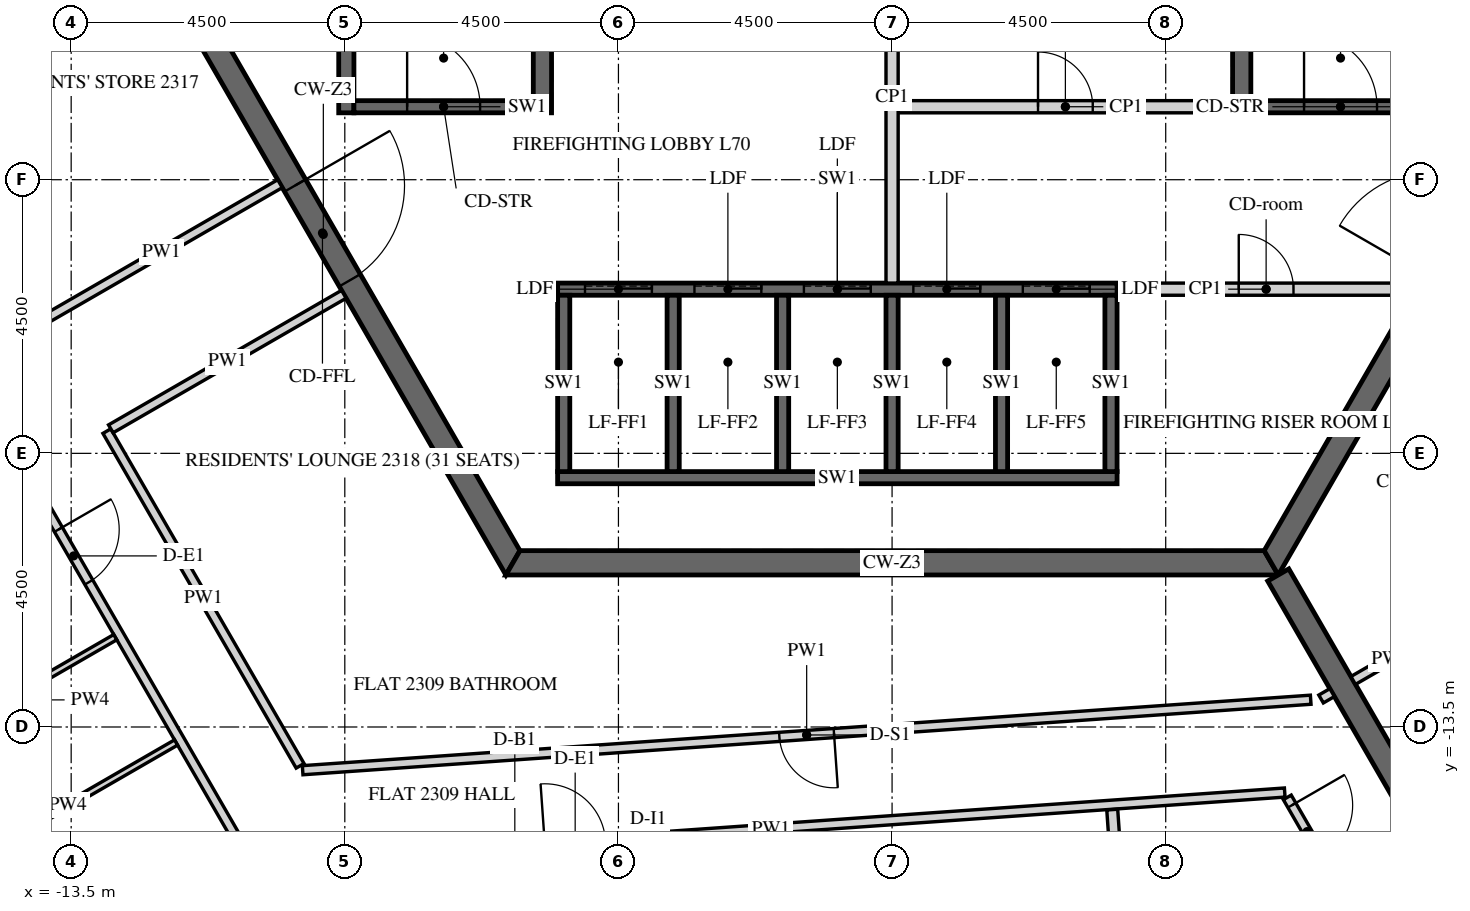
"""IFC4 building model, lengths in metres.
Left out: names, types, materials, properties, quantities, classifications, styles, units other than length and angle.
Written with IfcOpenShell. Run it as: python <this file> out.ifc"""

import sys

from ifc_helpers import new_model, si_unit, direction, frame, frame_2d, origin, place, context, subcontext, project, spatial, polyline, rectangle, outline, extrude, element, fill, save


model = new_model("IFC4")
c1 = context("Model", 3, precision=1e-05, world=origin(), true_north=direction((0.0, 1.0)))
c2 = subcontext(c1, "Body", "Model", "MODEL_VIEW")
j1 = project(units=[si_unit("LENGTHUNIT", "METRE"), si_unit("PLANEANGLEUNIT", "RADIAN")], contexts=[c1])
p1 = place(None, origin())
s1 = spatial("IfcSite", under=j1, at=p1, CompositionType="ELEMENT")
p2 = place(p1, origin())
s2 = spatial("IfcBuilding", under=s1, at=p2, CompositionType="ELEMENT")
p3 = place(p2, frame((0.0, 0.0, 291.3)))
s3 = spatial("IfcBuildingStorey", under=s2, at=p3, CompositionType="ELEMENT", Elevation=291.3)
p4 = place(p3, frame((-12.471, 0.0, -0.15), z_axis=(0.0, 0.0, 1.0), x_axis=(0.499996419489, -0.866027470984, 0.0)))
e1 = element("IfcWall", 1, at=p4, inside=s3, PredefinedType="SHEAR", context=c2, shape_type="SweptSolid", body=[
    extrude(outline(polyline([(-0.115, -0.2), (12.586, -0.2), (12.355, 0.2), (0.115, 0.2), (-0.115, -0.2)])), origin(), (0.0, 0.0, 1.0), 3.9),
])
p5 = place(p4, frame((5.306, 0.0, 0.15)))
e2 = element("IfcOpeningElement", 2, at=p5, cuts=e1, PredefinedType="OPENING", context=c2, shape_type="SweptSolid", body=[
    extrude(rectangle(XDim=1.8, YDim=2.4, at=frame_2d((0.9, 1.2))), frame((0.0, 0.21, 0.0), z_axis=(0.0, -1.0, 0.0), x_axis=(1.0, 0.0, 0.0)), (0.0, 0.0, 1.0), 0.42),
])
p6 = place(p3, frame((-6.235, -10.8, -0.15), z_axis=(0.0, 0.0, 1.0), x_axis=(1.0, 0.0, 0.0)))
e3 = element("IfcWall", 3, at=p6, inside=s3, PredefinedType="SHEAR", context=c2, shape_type="SweptSolid", body=[
    extrude(outline(polyline([(-0.115, -0.2), (12.586, -0.2), (12.355, 0.2), (0.115, 0.2), (-0.115, -0.2)])), origin(), (0.0, 0.0, 1.0), 3.9),
])
p7 = place(p3, frame((6.235, -10.8, -0.15), z_axis=(0.0, 0.0, 1.0), x_axis=(0.499996419489, 0.866027470984, 0.0)))
e4 = element("IfcWall", 4, at=p7, inside=s3, PredefinedType="SHEAR", context=c2, shape_type="SweptSolid", body=[
    extrude(outline(polyline([(-0.115, -0.2), (12.586, -0.2), (12.355, 0.2), (0.115, 0.2), (-0.115, -0.2)])), origin(), (0.0, 0.0, 1.0), 3.9),
])
p8 = place(p7, frame((5.364, 0.0, 0.15)))
e5 = element("IfcOpeningElement", 5, at=p8, cuts=e4, PredefinedType="OPENING", context=c2, shape_type="SweptSolid", body=[
    extrude(rectangle(XDim=1.8, YDim=2.4, at=frame_2d((0.9, 1.2))), frame((0.0, 0.21, 0.0), z_axis=(0.0, -1.0, 0.0), x_axis=(1.0, 0.0, 0.0)), (0.0, 0.0, 1.0), 0.42),
])
p9 = place(p3, frame((6.351, -11.0, -0.15), z_axis=(0.0, 0.0, 1.0), x_axis=(0.499998894578, -0.866026041999, 0.0)))
e6 = element("IfcWall", 6, at=p9, inside=s3, PredefinedType="SHEAR", context=c2, shape_type="SweptSolid", body=[
    extrude(rectangle(XDim=15.544, YDim=0.4, at=frame_2d((7.772, 0.0))), origin(), (0.0, 0.0, 1.0), 3.9),
])
p10 = place(p9, frame((6.872, 0.0, 0.15)))
e7 = element("IfcOpeningElement", 7, at=p10, cuts=e6, PredefinedType="OPENING", context=c2, shape_type="SweptSolid", body=[
    extrude(rectangle(XDim=1.8, YDim=2.4, at=frame_2d((0.9, 1.2))), frame((0.0, 0.21, 0.0), z_axis=(0.0, -1.0, 0.0), x_axis=(1.0, 0.0, 0.0)), (0.0, 0.0, 1.0), 0.42),
])
p11 = place(p3, frame((-5.5, -6.3, -0.25), z_axis=(0.0, 0.0, 1.0), x_axis=(1.0, 0.0, 0.0)))
e8 = element("IfcWall", 8, at=p11, inside=s3, PredefinedType="SHEAR", context=c2, shape_type="SweptSolid", body=[
    extrude(rectangle(XDim=9.2, YDim=0.2, at=frame_2d((4.6, 0.0))), origin(), (0.0, 0.0, 1.0), 3.9),
])
p12 = place(p11, frame((0.45, 0.0, 0.25)))
e9 = element("IfcOpeningElement", 9, at=p12, cuts=e8, PredefinedType="OPENING", context=c2, shape_type="SweptSolid", body=[
    extrude(rectangle(XDim=1.1, YDim=2.1, at=frame_2d((0.55, 1.05))), frame((0.0, 0.11, 0.0), z_axis=(0.0, -1.0, 0.0), x_axis=(1.0, 0.0, 0.0)), (0.0, 0.0, 1.0), 0.22),
])
p13 = place(p11, frame((2.25, 0.0, 0.25)))
e10 = element("IfcOpeningElement", 10, at=p13, cuts=e8, PredefinedType="OPENING", context=c2, shape_type="SweptSolid", body=[
    extrude(rectangle(XDim=1.1, YDim=2.1, at=frame_2d((0.55, 1.05))), frame((0.0, 0.11, 0.0), z_axis=(0.0, -1.0, 0.0), x_axis=(1.0, 0.0, 0.0)), (0.0, 0.0, 1.0), 0.22),
])
p14 = place(p11, frame((4.05, 0.0, 0.25)))
e11 = element("IfcOpeningElement", 11, at=p14, cuts=e8, PredefinedType="OPENING", context=c2, shape_type="SweptSolid", body=[
    extrude(rectangle(XDim=1.1, YDim=2.1, at=frame_2d((0.55, 1.05))), frame((0.0, 0.11, 0.0), z_axis=(0.0, -1.0, 0.0), x_axis=(1.0, 0.0, 0.0)), (0.0, 0.0, 1.0), 0.22),
])
p15 = place(p11, frame((5.85, 0.0, 0.25)))
e12 = element("IfcOpeningElement", 12, at=p15, cuts=e8, PredefinedType="OPENING", context=c2, shape_type="SweptSolid", body=[
    extrude(rectangle(XDim=1.1, YDim=2.1, at=frame_2d((0.55, 1.05))), frame((0.0, 0.11, 0.0), z_axis=(0.0, -1.0, 0.0), x_axis=(1.0, 0.0, 0.0)), (0.0, 0.0, 1.0), 0.22),
])
p16 = place(p11, frame((7.65, 0.0, 0.25)))
e13 = element("IfcOpeningElement", 13, at=p16, cuts=e8, PredefinedType="OPENING", context=c2, shape_type="SweptSolid", body=[
    extrude(rectangle(XDim=1.1, YDim=2.1, at=frame_2d((0.55, 1.05))), frame((0.0, 0.11, 0.0), z_axis=(0.0, -1.0, 0.0), x_axis=(1.0, 0.0, 0.0)), (0.0, 0.0, 1.0), 0.22),
])
p17 = place(p3, frame((-5.5, -9.4, -0.25), z_axis=(0.0, 0.0, 1.0), x_axis=(1.0, 0.0, 0.0)))
e14 = element("IfcWall", 14, at=p17, inside=s3, PredefinedType="SHEAR", context=c2, shape_type="SweptSolid", body=[
    extrude(rectangle(XDim=9.2, YDim=0.2, at=frame_2d((4.6, 0.0))), origin(), (0.0, 0.0, 1.0), 3.9),
])
for number, where, z_axis, x_axis in (
    (15, (-5.4, -9.3, -0.25), (0.0, 0.0, 1.0), (0.0, 1.0, 0.0)),
    (16, (-3.6, -9.3, -0.25), (0.0, 0.0, 1.0), (0.0, 1.0, 0.0)),
    (17, (-1.8, -9.3, -0.25), (0.0, 0.0, 1.0), (0.0, 1.0, 0.0)),
    (18, (0.0, -9.3, -0.25), (0.0, 0.0, 1.0), (0.0, 1.0, 0.0)),
    (19, (1.8, -9.3, -0.25), (0.0, 0.0, 1.0), (0.0, 1.0, 0.0)),
    (20, (3.6, -9.3, -0.25), (0.0, 0.0, 1.0), (0.0, 1.0, 0.0)),
):
    element("IfcWall", number, at=place(p3, frame(where, z_axis=z_axis, x_axis=x_axis)), inside=s3, PredefinedType="SHEAR", context=c2, shape_type="SweptSolid", body=[
        extrude(rectangle(XDim=2.9, YDim=0.2, at=frame_2d((1.45, 0.0))), origin(), (0.0, 0.0, 1.0), 3.9),
    ])
p18 = place(p3, frame((0.1, -3.3, 0.0), z_axis=(0.0, 0.0, 1.0), x_axis=(1.0, 0.0, 0.0)))
e21 = element("IfcWall", 21, at=p18, inside=s3, PredefinedType="PARTITIONING", context=c2, shape_type="SweptSolid", body=[
    extrude(rectangle(XDim=5.5, YDim=0.2, at=frame_2d((2.75, 0.0))), origin(), (0.0, 0.0, 1.0), 3.65),
])
p19 = place(p18, frame((2.3, 0.0, 0.0)))
e22 = element("IfcOpeningElement", 22, at=p19, cuts=e21, PredefinedType="OPENING", context=c2, shape_type="SweptSolid", body=[
    extrude(rectangle(XDim=0.9, YDim=2.1, at=frame_2d((0.45, 1.05))), frame((0.0, 0.11, 0.0), z_axis=(0.0, -1.0, 0.0), x_axis=(1.0, 0.0, 0.0)), (0.0, 0.0, 1.0), 0.22),
])
p20 = place(p3, frame((0.0, -6.2, 0.0), z_axis=(0.0, 0.0, 1.0), x_axis=(0.0, 1.0, 0.0)))
e23 = element("IfcWall", 23, at=p20, inside=s3, PredefinedType="PARTITIONING", context=c2, shape_type="SweptSolid", body=[
    extrude(rectangle(XDim=6.1, YDim=0.2, at=frame_2d((3.05, 0.0))), origin(), (0.0, 0.0, 1.0), 3.65),
])
p21 = place(p3, frame((3.7, -6.3, 0.0), z_axis=(0.0, 0.0, 1.0), x_axis=(1.0, 0.0, 0.0)))
e24 = element("IfcWall", 24, at=p21, inside=s3, PredefinedType="PARTITIONING", context=c2, shape_type="SweptSolid", body=[
    extrude(rectangle(XDim=4.903, YDim=0.2, at=frame_2d((2.451, 0.0))), origin(), (0.0, 0.0, 1.0), 3.65),
])
p22 = place(p21, frame((2.001, 0.0, 0.0)))
e25 = element("IfcOpeningElement", 25, at=p22, cuts=e24, PredefinedType="OPENING", context=c2, shape_type="SweptSolid", body=[
    extrude(rectangle(XDim=0.9, YDim=2.1, at=frame_2d((0.45, 1.05))), frame((0.0, 0.11, 0.0), z_axis=(0.0, -1.0, 0.0), x_axis=(1.0, 0.0, 0.0)), (0.0, 0.0, 1.0), 0.22),
])
p23 = place(p3, frame((5.75, -3.4, -0.25), z_axis=(0.0, 0.0, 1.0), x_axis=(0.0, 1.0, 0.0)))
e26 = element("IfcWall", 26, at=p23, inside=s3, PredefinedType="SHEAR", context=c2, shape_type="SweptSolid", body=[
    extrude(rectangle(XDim=6.8, YDim=0.3, at=frame_2d((3.4, 0.0))), origin(), (0.0, 0.0, 1.0), 3.9),
])
p24 = place(p3, frame((5.9, -3.3, -0.25), z_axis=(0.0, 0.0, 1.0), x_axis=(1.0, 0.0, 0.0)))
e27 = element("IfcWall", 27, at=p24, inside=s3, PredefinedType="SHEAR", context=c2, shape_type="SweptSolid", body=[
    extrude(rectangle(XDim=2.95, YDim=0.2, at=frame_2d((1.475, 0.0))), origin(), (0.0, 0.0, 1.0), 3.9),
])
p25 = place(p24, frame((0.875, 0.0, 0.25)))
e28 = element("IfcOpeningElement", 28, at=p25, cuts=e27, PredefinedType="OPENING", context=c2, shape_type="SweptSolid", body=[
    extrude(rectangle(XDim=1.2, YDim=2.4, at=frame_2d((0.6, 1.2))), frame((0.0, 0.11, 0.0), z_axis=(0.0, -1.0, 0.0), x_axis=(1.0, 0.0, 0.0)), (0.0, 0.0, 1.0), 0.22),
])
p26 = place(p3, frame((-5.75, -3.4, -0.25), z_axis=(0.0, 0.0, 1.0), x_axis=(0.0, 1.0, 0.0)))
e29 = element("IfcWall", 29, at=p26, inside=s3, PredefinedType="SHEAR", context=c2, shape_type="SweptSolid", body=[
    extrude(rectangle(XDim=6.8, YDim=0.3, at=frame_2d((3.4, 0.0))), origin(), (0.0, 0.0, 1.0), 3.9),
])
p27 = place(p3, frame((-8.975, -3.4, -0.25), z_axis=(0.0, 0.0, 1.0), x_axis=(0.0, 1.0, 0.0)))
e30 = element("IfcWall", 30, at=p27, inside=s3, PredefinedType="SHEAR", context=c2, shape_type="SweptSolid", body=[
    extrude(rectangle(XDim=6.8, YDim=0.25, at=frame_2d((3.4, 0.0))), origin(), (0.0, 0.0, 1.0), 3.9),
])
p28 = place(p3, frame((-8.85, -3.3, -0.25), z_axis=(0.0, 0.0, 1.0), x_axis=(1.0, 0.0, 0.0)))
e31 = element("IfcWall", 31, at=p28, inside=s3, PredefinedType="SHEAR", context=c2, shape_type="SweptSolid", body=[
    extrude(rectangle(XDim=2.95, YDim=0.2, at=frame_2d((1.475, 0.0))), origin(), (0.0, 0.0, 1.0), 3.9),
])
p29 = place(p28, frame((0.875, 0.0, 0.25)))
e32 = element("IfcOpeningElement", 32, at=p29, cuts=e31, PredefinedType="OPENING", context=c2, shape_type="SweptSolid", body=[
    extrude(rectangle(XDim=1.2, YDim=2.4, at=frame_2d((0.6, 1.2))), frame((0.0, 0.11, 0.0), z_axis=(0.0, -1.0, 0.0), x_axis=(1.0, 0.0, 0.0)), (0.0, 0.0, 1.0), 0.22),
])
p30 = place(p3, frame((-17.998, -2.826, 0.0), z_axis=(0.0, 0.0, 1.0), x_axis=(0.500003306199, -0.866023494941, 0.0)))
e33 = element("IfcWall", 33, at=p30, inside=s3, PredefinedType="PARTITIONING", context=c2, shape_type="SweptSolid", body=[
    extrude(rectangle(XDim=14.949, YDim=0.15, at=frame_2d((7.475, 0.0))), origin(), (0.0, 0.0, 1.0), 2.988),
])
p31 = place(p30, frame((2.725, 0.0, 0.0)))
e34 = element("IfcOpeningElement", 34, at=p31, cuts=e33, PredefinedType="OPENING", context=c2, shape_type="SweptSolid", body=[
    extrude(rectangle(XDim=1.0, YDim=2.1, at=frame_2d((0.5, 1.05))), frame((0.0, 0.085, 0.0), z_axis=(0.0, -1.0, 0.0), x_axis=(1.0, 0.0, 0.0)), (0.0, 0.0, 1.0), 0.17),
])
p32 = place(p30, frame((8.576, 0.0, 0.0)))
e35 = element("IfcOpeningElement", 35, at=p32, cuts=e33, PredefinedType="OPENING", context=c2, shape_type="SweptSolid", body=[
    extrude(rectangle(XDim=1.0, YDim=2.1, at=frame_2d((0.5, 1.05))), frame((0.0, 0.085, 0.0), z_axis=(0.0, -1.0, 0.0), x_axis=(1.0, 0.0, 0.0)), (0.0, 0.0, 1.0), 0.17),
])
p33 = place(p3, frame((-10.44, -15.767, 0.0), z_axis=(0.0, 0.0, 1.0), x_axis=(0.997534721961, 0.070174628483, 0.0)))
e36 = element("IfcWall", 36, at=p33, inside=s3, PredefinedType="PARTITIONING", context=c2, shape_type="SweptSolid", body=[
    extrude(rectangle(XDim=16.939, YDim=0.15, at=frame_2d((8.47, 0.0))), origin(), (0.0, 0.0, 1.0), 2.988),
])
p34 = place(p33, frame((4.742, 0.0, 0.0)))
e37 = element("IfcOpeningElement", 37, at=p34, cuts=e36, PredefinedType="OPENING", context=c2, shape_type="SweptSolid", body=[
    extrude(rectangle(XDim=1.0, YDim=2.1, at=frame_2d((0.5, 1.05))), frame((0.0, 0.085, 0.0), z_axis=(0.0, -1.0, 0.0), x_axis=(1.0, 0.0, 0.0)), (0.0, 0.0, 1.0), 0.17),
])
p35 = place(p3, frame((6.5, -14.657, 0.0), z_axis=(0.0, 0.0, 1.0), x_axis=(0.499966098742, -0.8660449758, 0.0)))
e38 = element("IfcWall", 38, at=p35, inside=s3, PredefinedType="PARTITIONING", context=c2, shape_type="SweptSolid", body=[
    extrude(rectangle(XDim=7.431, YDim=0.15, at=frame_2d((3.715, 0.0))), origin(), (0.0, 0.0, 1.0), 2.988),
])
p36 = place(p35, frame((0.15, 0.0, 0.0)))
e39 = element("IfcOpeningElement", 39, at=p36, cuts=e38, PredefinedType="OPENING", context=c2, shape_type="SweptSolid", body=[
    extrude(rectangle(XDim=1.0, YDim=2.1, at=frame_2d((0.5, 1.05))), frame((0.0, 0.085, 0.0), z_axis=(0.0, -1.0, 0.0), x_axis=(1.0, 0.0, 0.0)), (0.0, 0.0, 1.0), 0.17),
])
p37 = place(p3, frame((-10.066, -4.566, 0.0), z_axis=(0.0, 0.0, 1.0), x_axis=(-0.866031096941, -0.499990139034, 0.0)))
e40 = element("IfcWall", 40, at=p37, inside=s3, PredefinedType="PARTITIONING", context=c2, shape_type="SweptSolid", body=[
    extrude(rectangle(XDim=4.5, YDim=0.15, at=frame_2d((2.25, 0.0))), origin(), (0.0, 0.0, 1.0), 2.988),
])
p38 = place(p3, frame((7.237, -12.935, 0.0), z_axis=(0.0, 0.0, 1.0), x_axis=(-0.866088799389, -0.499890179513, 0.0)))
e41 = element("IfcWall", 41, at=p38, inside=s3, PredefinedType="PARTITIONING", context=c2, shape_type="SweptSolid", body=[
    extrude(rectangle(XDim=0.21, YDim=0.15, at=frame_2d((0.105, 0.0))), origin(), (0.0, 0.0, 1.0), 2.988),
])
p39 = place(p3, frame((6.884, -13.052, 0.0), z_axis=(0.0, 0.0, 1.0), x_axis=(-0.997564224443, -0.069753982764, 0.0)))
e42 = element("IfcWall", 42, at=p39, inside=s3, PredefinedType="PARTITIONING", context=c2, shape_type="SweptSolid", body=[
    extrude(rectangle(XDim=16.618, YDim=0.15, at=frame_2d((8.309, 0.0))), origin(), (0.0, 0.0, 1.0), 2.988),
])
p40 = place(p39, frame((7.859, 0.0, 0.0)))
e43 = element("IfcOpeningElement", 43, at=p40, cuts=e42, PredefinedType="OPENING", context=c2, shape_type="SweptSolid", body=[
    extrude(rectangle(XDim=0.9, YDim=2.1, at=frame_2d((0.45, 1.05))), frame((0.0, 0.085, 0.0), z_axis=(0.0, -1.0, 0.0), x_axis=(1.0, 0.0, 0.0)), (0.0, 0.0, 1.0), 0.17),
])
p41 = place(p3, frame((-9.735, -14.138, 0.0), z_axis=(0.0, 0.0, 1.0), x_axis=(-0.500018385592, 0.866014788598, 0.0)))
e44 = element("IfcWall", 44, at=p41, inside=s3, PredefinedType="PARTITIONING", context=c2, shape_type="SweptSolid", body=[
    extrude(rectangle(XDim=6.356, YDim=0.15, at=frame_2d((3.178, 0.0))), origin(), (0.0, 0.0, 1.0), 2.988),
])
p42 = place(p3, frame((-12.848, -8.597, 0.0), z_axis=(0.0, 0.0, 1.0), x_axis=(0.866017452598, 0.500013771606, 0.0)))
e45 = element("IfcWall", 45, at=p42, inside=s3, PredefinedType="PARTITIONING", context=c2, shape_type="SweptSolid", body=[
    extrude(rectangle(XDim=4.425, YDim=0.15, at=frame_2d((2.213, 0.0))), origin(), (0.0, 0.0, 1.0), 2.988),
])
p43 = place(p3, frame((8.817, -12.022, 0.0), z_axis=(0.0, 0.0, 1.0), x_axis=(-0.866062911188, -0.499935029643, 0.0)))
e46 = element("IfcWall", 46, at=p43, inside=s3, PredefinedType="PARTITIONING", context=c2, shape_type="SweptSolid", body=[
    extrude(rectangle(XDim=1.425, YDim=0.15, at=frame_2d((0.712, 0.0))), origin(), (0.0, 0.0, 1.0), 2.988),
])
p44 = place(p3, frame((-11.775, -13.755, 0.0), z_axis=(0.0, 0.0, 1.0), x_axis=(-0.866034795751, -0.499983732284, 0.0)))
e47 = element("IfcWall", 47, at=p44, inside=s3, PredefinedType="PARTITIONING", context=c2, shape_type="SweptSolid", body=[
    extrude(rectangle(XDim=4.125, YDim=0.1, at=frame_2d((2.062, 0.0))), origin(), (0.0, 0.0, 1.0), 2.988),
])
p45 = place(p3, frame((-16.347, -14.085, 0.0), z_axis=(0.0, 0.0, 1.0), x_axis=(0.866034795751, 0.499983732284, 0.0)))
e48 = element("IfcWall", 48, at=p45, inside=s3, PredefinedType="PARTITIONING", context=c2, shape_type="SweptSolid", body=[
    extrude(rectangle(XDim=4.125, YDim=0.1, at=frame_2d((2.062, 0.0))), origin(), (0.0, 0.0, 1.0), 2.988),
])
p46 = place(p45, frame((1.7, 0.0, 0.0)))
e49 = element("IfcOpeningElement", 49, at=p46, cuts=e48, PredefinedType="OPENING", context=c2, shape_type="SweptSolid", body=[
    extrude(rectangle(XDim=0.8, YDim=2.1, at=frame_2d((0.4, 1.05))), frame((0.0, 0.06, 0.0), z_axis=(0.0, -1.0, 0.0), x_axis=(1.0, 0.0, 0.0)), (0.0, 0.0, 1.0), 0.12),
])
p47 = place(p3, frame((4.208, -23.263, 0.0), z_axis=(0.0, 0.0, 1.0), x_axis=(-0.069749826803, 0.997564515037, 0.0)))
e50 = element("IfcWall", 50, at=p47, inside=s3, PredefinedType="PARTITIONING", context=c2, shape_type="SweptSolid", body=[
    extrude(rectangle(XDim=8.425, YDim=0.18, at=frame_2d((4.212, 0.0))), origin(), (0.0, 0.0, 1.0), 2.988),
])
p48 = place(p5, origin())
e51 = element("IfcDoor", 51, at=p48, inside=s3, OperationType="DOUBLE_DOOR_SINGLE_SWING", PredefinedType="DOOR", context=c2, shape_type="SweptSolid", body=[
    extrude(rectangle(XDim=1.8, YDim=2.4, at=frame_2d((0.9, 1.2))), frame((0.0, 0.025, 0.0), z_axis=(0.0, -1.0, 0.0), x_axis=(1.0, 0.0, 0.0)), (0.0, 0.0, 1.0), 0.05),
])
fill(e2, e51)
p49 = place(p19, origin())
e52 = element("IfcDoor", 52, at=p49, inside=s3, OperationType="SINGLE_SWING_LEFT", PredefinedType="DOOR", context=c2, shape_type="SweptSolid", body=[
    extrude(rectangle(XDim=0.9, YDim=2.1, at=frame_2d((0.45, 1.05))), frame((0.0, 0.025, 0.0), z_axis=(0.0, -1.0, 0.0), x_axis=(1.0, 0.0, 0.0)), (0.0, 0.0, 1.0), 0.05),
])
fill(e22, e52)
p50 = place(p22, origin())
e53 = element("IfcDoor", 53, at=p50, inside=s3, OperationType="SINGLE_SWING_LEFT", PredefinedType="DOOR", context=c2, shape_type="SweptSolid", body=[
    extrude(rectangle(XDim=0.9, YDim=2.1, at=frame_2d((0.45, 1.05))), frame((0.0, 0.025, 0.0), z_axis=(0.0, -1.0, 0.0), x_axis=(1.0, 0.0, 0.0)), (0.0, 0.0, 1.0), 0.05),
])
fill(e25, e53)
p51 = place(p25, origin())
e54 = element("IfcDoor", 54, at=p51, inside=s3, OperationType="SINGLE_SWING_LEFT", PredefinedType="DOOR", context=c2, shape_type="SweptSolid", body=[
    extrude(rectangle(XDim=1.2, YDim=2.4, at=frame_2d((0.6, 1.2))), frame((0.0, 0.025, 0.0), z_axis=(0.0, -1.0, 0.0), x_axis=(1.0, 0.0, 0.0)), (0.0, 0.0, 1.0), 0.05),
])
fill(e28, e54)
p52 = place(p29, origin())
e55 = element("IfcDoor", 55, at=p52, inside=s3, OperationType="SINGLE_SWING_LEFT", PredefinedType="DOOR", context=c2, shape_type="SweptSolid", body=[
    extrude(rectangle(XDim=1.2, YDim=2.4, at=frame_2d((0.6, 1.2))), frame((0.0, 0.025, 0.0), z_axis=(0.0, -1.0, 0.0), x_axis=(1.0, 0.0, 0.0)), (0.0, 0.0, 1.0), 0.05),
])
fill(e32, e55)
p53 = place(p12, origin())
e56 = element("IfcDoor", 56, at=p53, inside=s3, OperationType="SLIDING_TO_LEFT", PredefinedType="DOOR", context=c2, shape_type="SweptSolid", body=[
    extrude(rectangle(XDim=1.1, YDim=2.1, at=frame_2d((0.55, 1.05))), frame((0.0, 0.025, 0.0), z_axis=(0.0, -1.0, 0.0), x_axis=(1.0, 0.0, 0.0)), (0.0, 0.0, 1.0), 0.05),
])
fill(e9, e56)
p54 = place(p13, origin())
e57 = element("IfcDoor", 57, at=p54, inside=s3, OperationType="SLIDING_TO_LEFT", PredefinedType="DOOR", context=c2, shape_type="SweptSolid", body=[
    extrude(rectangle(XDim=1.1, YDim=2.1, at=frame_2d((0.55, 1.05))), frame((0.0, 0.025, 0.0), z_axis=(0.0, -1.0, 0.0), x_axis=(1.0, 0.0, 0.0)), (0.0, 0.0, 1.0), 0.05),
])
fill(e10, e57)
p55 = place(p14, origin())
e58 = element("IfcDoor", 58, at=p55, inside=s3, OperationType="SLIDING_TO_LEFT", PredefinedType="DOOR", context=c2, shape_type="SweptSolid", body=[
    extrude(rectangle(XDim=1.1, YDim=2.1, at=frame_2d((0.55, 1.05))), frame((0.0, 0.025, 0.0), z_axis=(0.0, -1.0, 0.0), x_axis=(1.0, 0.0, 0.0)), (0.0, 0.0, 1.0), 0.05),
])
fill(e11, e58)
p56 = place(p15, origin())
e59 = element("IfcDoor", 59, at=p56, inside=s3, OperationType="SLIDING_TO_LEFT", PredefinedType="DOOR", context=c2, shape_type="SweptSolid", body=[
    extrude(rectangle(XDim=1.1, YDim=2.1, at=frame_2d((0.55, 1.05))), frame((0.0, 0.025, 0.0), z_axis=(0.0, -1.0, 0.0), x_axis=(1.0, 0.0, 0.0)), (0.0, 0.0, 1.0), 0.05),
])
fill(e12, e59)
p57 = place(p16, origin())
e60 = element("IfcDoor", 60, at=p57, inside=s3, OperationType="SLIDING_TO_LEFT", PredefinedType="DOOR", context=c2, shape_type="SweptSolid", body=[
    extrude(rectangle(XDim=1.1, YDim=2.1, at=frame_2d((0.55, 1.05))), frame((0.0, 0.025, 0.0), z_axis=(0.0, -1.0, 0.0), x_axis=(1.0, 0.0, 0.0)), (0.0, 0.0, 1.0), 0.05),
])
fill(e13, e60)
p58 = place(p32, origin())
e61 = element("IfcDoor", 61, at=p58, inside=s3, OperationType="SINGLE_SWING_RIGHT", PredefinedType="DOOR", context=c2, shape_type="SweptSolid", body=[
    extrude(rectangle(XDim=1.0, YDim=2.1, at=frame_2d((0.5, 1.05))), frame((0.0, 0.025, 0.0), z_axis=(0.0, -1.0, 0.0), x_axis=(1.0, 0.0, 0.0)), (0.0, 0.0, 1.0), 0.05),
])
fill(e35, e61)
p59 = place(p36, origin())
e62 = element("IfcDoor", 62, at=p59, inside=s3, OperationType="SINGLE_SWING_RIGHT", PredefinedType="DOOR", context=c2, shape_type="SweptSolid", body=[
    extrude(rectangle(XDim=1.0, YDim=2.1, at=frame_2d((0.5, 1.05))), frame((0.0, 0.025, 0.0), z_axis=(0.0, -1.0, 0.0), x_axis=(1.0, 0.0, 0.0)), (0.0, 0.0, 1.0), 0.05),
])
fill(e39, e62)
p60 = place(p40, origin())
e63 = element("IfcDoor", 63, at=p60, inside=s3, OperationType="SINGLE_SWING_RIGHT", PredefinedType="DOOR", context=c2, shape_type="SweptSolid", body=[
    extrude(rectangle(XDim=0.9, YDim=2.1, at=frame_2d((0.45, 1.05))), frame((0.0, 0.025, 0.0), z_axis=(0.0, -1.0, 0.0), x_axis=(1.0, 0.0, 0.0)), (0.0, 0.0, 1.0), 0.05),
])
fill(e43, e63)
save(model, sys.argv[1])
